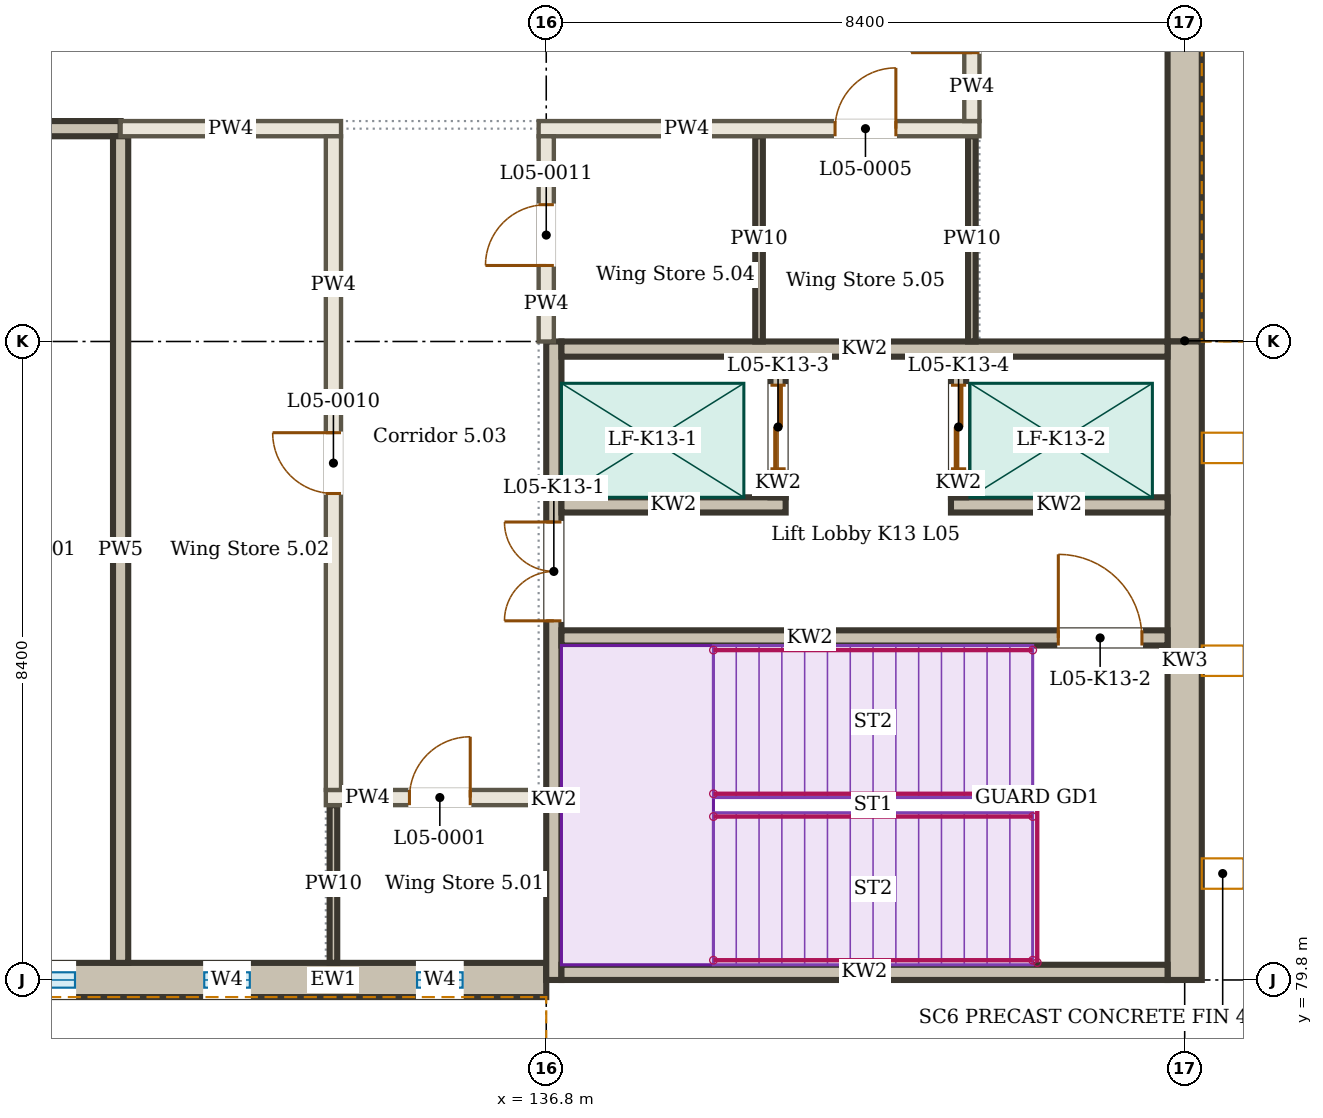
"""IFC4 building model, lengths in metres.
Left out: names, types, materials, properties, quantities, classifications, styles, units other than length and angle.
Written with IfcOpenShell. Run it as: python <this file> out.ifc"""

import sys

from ifc_helpers import new_model, si_unit, direction, frame, frame_2d, origin, place, context, subcontext, project, spatial, rectangle, extrude, element, fill, save


model = new_model("IFC4")
c1 = context("Model", 3, precision=1e-05, world=origin(), true_north=direction((0.0, 1.0)))
c2 = subcontext(c1, "Body", "Model", "MODEL_VIEW")
j1 = project(units=[si_unit("LENGTHUNIT", "METRE"), si_unit("PLANEANGLEUNIT", "RADIAN")], contexts=[c1])
p1 = place(None, origin())
s1 = spatial("IfcSite", under=j1, at=p1, CompositionType="ELEMENT")
p2 = place(p1, origin())
s2 = spatial("IfcBuilding", under=s1, at=p2, CompositionType="ELEMENT")
p3 = place(p2, frame((0.0, 0.0, 22.5)))
s3 = spatial("IfcBuildingStorey", under=s2, at=p3, CompositionType="ELEMENT", Elevation=22.5)
p4 = place(p3, frame((145.2, 88.2, 0.0), z_axis=(0.0, 0.0, 1.0), x_axis=(0.0, 1.0, 0.0)))
e1 = element("IfcWall", 1, at=p4, inside=s3, PredefinedType="SOLIDWALL", context=c2, shape_type="SweptSolid", body=[
    extrude(rectangle(XDim=8.218, YDim=0.45, at=frame_2d((4.109, 0.0))), origin(), (0.0, 0.0, 1.0), 3.85),
])
p5 = place(p3, frame((128.597, 79.8, 0.0), z_axis=(0.0, 0.0, 1.0), x_axis=(1.0, 0.0, 0.0)))
e2 = element("IfcWall", 2, at=p5, inside=s3, PredefinedType="SOLIDWALL", context=c2, shape_type="SweptSolid", body=[
    extrude(rectangle(XDim=8.203, YDim=0.45, at=frame_2d((4.101, 0.0))), origin(), (0.0, 0.0, 1.0), 3.85),
])
p6 = place(p5, frame((0.403, 0.0, 0.9)))
e3 = element("IfcOpeningElement", 3, at=p6, cuts=e2, PredefinedType="OPENING", context=c2, shape_type="SweptSolid", body=[
    extrude(rectangle(XDim=1.6, YDim=1.2, at=frame_2d((0.8, 0.6))), frame((0.0, 0.235, 0.0), z_axis=(0.0, -1.0, 0.0), x_axis=(1.0, 0.0, 0.0)), (0.0, 0.0, 1.0), 0.47),
])
p7 = place(p5, frame((3.702, 0.0, 2.1)))
e4 = element("IfcOpeningElement", 4, at=p7, cuts=e2, PredefinedType="OPENING", context=c2, shape_type="SweptSolid", body=[
    extrude(rectangle(XDim=0.6, YDim=1.2, at=frame_2d((0.3, 0.6))), frame((0.0, 0.235, 0.0), z_axis=(0.0, -1.0, 0.0), x_axis=(1.0, 0.0, 0.0)), (0.0, 0.0, 1.0), 0.47),
])
p8 = place(p5, frame((6.502, 0.0, 2.1)))
e5 = element("IfcOpeningElement", 5, at=p8, cuts=e2, PredefinedType="OPENING", context=c2, shape_type="SweptSolid", body=[
    extrude(rectangle(XDim=0.6, YDim=1.2, at=frame_2d((0.3, 0.6))), frame((0.0, 0.235, 0.0), z_axis=(0.0, -1.0, 0.0), x_axis=(1.0, 0.0, 0.0)), (0.0, 0.0, 1.0), 0.47),
])
p9 = place(p3, frame((133.9, 82.2, 0.0), z_axis=(0.0, 0.0, 1.0), x_axis=(1.0, 0.0, 0.0)))
e6 = element("IfcWall", 6, at=p9, inside=s3, PredefinedType="PARTITIONING", context=c2, shape_type="SweptSolid", body=[
    extrude(rectangle(XDim=2.9, YDim=0.2, at=frame_2d((1.45, 0.0))), origin(), (0.0, 0.0, 1.0), 3.936),
])
p10 = place(p9, frame((1.1, 0.0, 0.0)))
e7 = element("IfcOpeningElement", 7, at=p10, cuts=e6, PredefinedType="OPENING", context=c2, shape_type="SweptSolid", body=[
    extrude(rectangle(XDim=0.8, YDim=2.1, at=frame_2d((0.4, 1.05))), frame((0.0, 0.11, 0.0), z_axis=(0.0, -1.0, 0.0), x_axis=(1.0, 0.0, 0.0)), (0.0, 0.0, 1.0), 0.22),
])
p11 = place(p3, frame((111.825, 91.0, 0.0), z_axis=(0.0, 0.0, 1.0), x_axis=(1.0, 0.0, 0.0)))
e8 = element("IfcWall", 8, at=p11, inside=s3, PredefinedType="SOLIDWALL", context=c2, shape_type="SweptSolid", body=[
    extrude(rectangle(XDim=19.375, YDim=0.2, at=frame_2d((9.688, 0.0))), origin(), (0.0, 0.0, 1.0), 3.844),
])
p12 = place(p11, frame((3.175, 0.0, 0.0)))
e9 = element("IfcOpeningElement", 9, at=p12, cuts=e8, PredefinedType="OPENING", context=c2, shape_type="SweptSolid", body=[
    extrude(rectangle(XDim=1.6, YDim=2.1, at=frame_2d((0.8, 1.05))), frame((0.0, 0.11, 0.0), z_axis=(0.0, -1.0, 0.0), x_axis=(1.0, 0.0, 0.0)), (0.0, 0.0, 1.0), 0.22),
])
p13 = place(p11, frame((10.175, 0.0, 0.0)))
e10 = element("IfcOpeningElement", 10, at=p13, cuts=e8, PredefinedType="OPENING", context=c2, shape_type="SweptSolid", body=[
    extrude(rectangle(XDim=1.6, YDim=2.1, at=frame_2d((0.8, 1.05))), frame((0.0, 0.11, 0.0), z_axis=(0.0, -1.0, 0.0), x_axis=(1.0, 0.0, 0.0)), (0.0, 0.0, 1.0), 0.22),
])
p14 = place(p11, frame((15.775, 0.0, 0.0)))
e11 = element("IfcOpeningElement", 11, at=p14, cuts=e8, PredefinedType="OPENING", context=c2, shape_type="SweptSolid", body=[
    extrude(rectangle(XDim=1.6, YDim=2.1, at=frame_2d((0.8, 1.05))), frame((0.0, 0.11, 0.0), z_axis=(0.0, -1.0, 0.0), x_axis=(1.0, 0.0, 0.0)), (0.0, 0.0, 1.0), 0.22),
])
p15 = place(p3, frame((131.2, 91.0, 0.0), z_axis=(0.0, 0.0, 1.0), x_axis=(1.0, 0.0, 0.0)))
e12 = element("IfcWall", 12, at=p15, inside=s3, PredefinedType="PARTITIONING", context=c2, shape_type="SweptSolid", body=[
    extrude(rectangle(XDim=2.9, YDim=0.2, at=frame_2d((1.45, 0.0))), origin(), (0.0, 0.0, 1.0), 3.936),
])
p16 = place(p3, frame((136.7, 91.0, 0.0), z_axis=(0.0, 0.0, 1.0), x_axis=(1.0, 0.0, 0.0)))
e13 = element("IfcWall", 13, at=p16, inside=s3, PredefinedType="PARTITIONING", context=c2, shape_type="SweptSolid", body=[
    extrude(rectangle(XDim=5.8, YDim=0.2, at=frame_2d((2.9, 0.0))), origin(), (0.0, 0.0, 1.0), 3.844),
])
p17 = place(p16, frame((3.9, 0.0, 0.0)))
e14 = element("IfcOpeningElement", 14, at=p17, cuts=e13, PredefinedType="OPENING", context=c2, shape_type="SweptSolid", body=[
    extrude(rectangle(XDim=0.8, YDim=2.1, at=frame_2d((0.4, 1.05))), frame((0.0, 0.11, 0.0), z_axis=(0.0, -1.0, 0.0), x_axis=(1.0, 0.0, 0.0)), (0.0, 0.0, 1.0), 0.22),
])
p18 = place(p3, frame((131.2, 80.025, 0.0), z_axis=(0.0, 0.0, 1.0), x_axis=(0.0, 1.0, 0.0)))
e15 = element("IfcWall", 15, at=p18, inside=s3, PredefinedType="SOLIDWALL", context=c2, shape_type="SweptSolid", body=[
    extrude(rectangle(XDim=10.875, YDim=0.2, at=frame_2d((5.438, 0.0))), origin(), (0.0, 0.0, 1.0), 3.844),
])
p19 = place(p3, frame((134.0, 80.025, 0.0), z_axis=(0.0, 0.0, 1.0), x_axis=(0.0, 1.0, 0.0)))
e16 = element("IfcWall", 16, at=p19, inside=s3, PredefinedType="SOLIDWALL", context=c2, shape_type="SweptSolid", body=[
    extrude(rectangle(XDim=2.075, YDim=0.1, at=frame_2d((1.038, 0.0))), origin(), (0.0, 0.0, 1.0), 3.936),
])
p20 = place(p3, frame((134.0, 82.3, 0.0), z_axis=(0.0, 0.0, 1.0), x_axis=(0.0, 1.0, 0.0)))
e17 = element("IfcWall", 17, at=p20, inside=s3, PredefinedType="PARTITIONING", context=c2, shape_type="SweptSolid", body=[
    extrude(rectangle(XDim=8.6, YDim=0.2, at=frame_2d((4.3, 0.0))), origin(), (0.0, 0.0, 1.0), 3.844),
])
p21 = place(p20, frame((3.9, 0.0, 0.0)))
e18 = element("IfcOpeningElement", 18, at=p21, cuts=e17, PredefinedType="OPENING", context=c2, shape_type="SweptSolid", body=[
    extrude(rectangle(XDim=0.8, YDim=2.1, at=frame_2d((0.4, 1.05))), frame((0.0, 0.11, 0.0), z_axis=(0.0, -1.0, 0.0), x_axis=(1.0, 0.0, 0.0)), (0.0, 0.0, 1.0), 0.22),
])
p22 = place(p3, frame((136.8, 88.2, 0.0), z_axis=(0.0, 0.0, 1.0), x_axis=(0.0, 1.0, 0.0)))
e19 = element("IfcWall", 19, at=p22, inside=s3, PredefinedType="PARTITIONING", context=c2, shape_type="SweptSolid", body=[
    extrude(rectangle(XDim=2.7, YDim=0.2, at=frame_2d((1.35, 0.0))), origin(), (0.0, 0.0, 1.0), 3.844),
])
p23 = place(p22, frame((1.0, 0.0, 0.0)))
e20 = element("IfcOpeningElement", 20, at=p23, cuts=e19, PredefinedType="OPENING", context=c2, shape_type="SweptSolid", body=[
    extrude(rectangle(XDim=0.8, YDim=2.1, at=frame_2d((0.4, 1.05))), frame((0.0, 0.11, 0.0), z_axis=(0.0, -1.0, 0.0), x_axis=(1.0, 0.0, 0.0)), (0.0, 0.0, 1.0), 0.22),
])
for number, where, z_axis, x_axis in (
    (21, (139.6, 88.2, 0.0), (0.0, 0.0, 1.0), (0.0, 1.0, 0.0)),
    (22, (142.4, 88.2, 0.0), (0.0, 0.0, 1.0), (0.0, 1.0, 0.0)),
):
    element("IfcWall", number, at=place(p3, frame(where, z_axis=z_axis, x_axis=x_axis)), inside=s3, PredefinedType="SOLIDWALL", context=c2, shape_type="SweptSolid", body=[
        extrude(rectangle(XDim=2.7, YDim=0.1, at=frame_2d((1.35, 0.0))), origin(), (0.0, 0.0, 1.0), 3.936),
    ])
p24 = place(p3, frame((142.4, 91.1, 0.0), z_axis=(0.0, 0.0, 1.0), x_axis=(0.0, 1.0, 0.0)))
e23 = element("IfcWall", 23, at=p24, inside=s3, PredefinedType="PARTITIONING", context=c2, shape_type="SweptSolid", body=[
    extrude(rectangle(XDim=2.6, YDim=0.2, at=frame_2d((1.3, 0.0))), origin(), (0.0, 0.0, 1.0), 3.936),
])
p25 = place(p24, frame((0.9, 0.0, 0.0)))
e24 = element("IfcOpeningElement", 24, at=p25, cuts=e23, PredefinedType="OPENING", context=c2, shape_type="SweptSolid", body=[
    extrude(rectangle(XDim=0.8, YDim=2.1, at=frame_2d((0.4, 1.05))), frame((0.0, 0.11, 0.0), z_axis=(0.0, -1.0, 0.0), x_axis=(1.0, 0.0, 0.0)), (0.0, 0.0, 1.0), 0.22),
])
p26 = place(p3, frame((136.9, 79.8, 0.0), z_axis=(0.0, 0.0, 1.0), x_axis=(0.0, 1.0, 0.0)))
e25 = element("IfcWall", 25, at=p26, inside=s3, PredefinedType="SOLIDWALL", context=c2, shape_type="SweptSolid", body=[
    extrude(rectangle(XDim=8.4, YDim=0.2, at=frame_2d((4.2, 0.0))), origin(), (0.0, 0.0, 1.0), 4.5),
])
p27 = place(p26, frame((4.725, 0.0, 0.0)))
e26 = element("IfcOpeningElement", 26, at=p27, cuts=e25, PredefinedType="OPENING", context=c2, shape_type="SweptSolid", body=[
    extrude(rectangle(XDim=1.3, YDim=2.1, at=frame_2d((0.65, 1.05))), frame((0.0, 0.11, 0.0), z_axis=(0.0, -1.0, 0.0), x_axis=(1.0, 0.0, 0.0)), (0.0, 0.0, 1.0), 0.22),
])
p28 = place(p3, frame((145.2, 79.8, 0.0), z_axis=(0.0, 0.0, 1.0), x_axis=(0.0, 1.0, 0.0)))
e27 = element("IfcWall", 27, at=p28, inside=s3, PredefinedType="SOLIDWALL", context=c2, shape_type="SweptSolid", body=[
    extrude(rectangle(XDim=8.4, YDim=0.45, at=frame_2d((4.2, 0.0))), origin(), (0.0, 0.0, 1.0), 4.5),
])
for number, where, z_axis, x_axis in (
    (28, (137.0, 79.9, 0.0), (0.0, 0.0, 1.0), (1.0, 0.0, 0.0)),
    (29, (137.0, 88.1, 0.0), (0.0, 0.0, 1.0), (1.0, 0.0, 0.0)),
):
    element("IfcWall", number, at=place(p3, frame(where, z_axis=z_axis, x_axis=x_axis)), inside=s3, PredefinedType="SOLIDWALL", context=c2, shape_type="SweptSolid", body=[
        extrude(rectangle(XDim=7.975, YDim=0.2, at=frame_2d((3.988, 0.0))), origin(), (0.0, 0.0, 1.0), 4.5),
    ])
p29 = place(p3, frame((137.0, 84.3, 0.0), z_axis=(0.0, 0.0, 1.0), x_axis=(1.0, 0.0, 0.0)))
e30 = element("IfcWall", 30, at=p29, inside=s3, PredefinedType="SOLIDWALL", context=c2, shape_type="SweptSolid", body=[
    extrude(rectangle(XDim=7.975, YDim=0.2, at=frame_2d((3.988, 0.0))), origin(), (0.0, 0.0, 1.0), 4.5),
])
p30 = place(p29, frame((6.538, 0.0, 0.0)))
e31 = element("IfcOpeningElement", 31, at=p30, cuts=e30, PredefinedType="OPENING", context=c2, shape_type="SweptSolid", body=[
    extrude(rectangle(XDim=1.1, YDim=2.1, at=frame_2d((0.55, 1.05))), frame((0.0, 0.11, 0.0), z_axis=(0.0, -1.0, 0.0), x_axis=(1.0, 0.0, 0.0)), (0.0, 0.0, 1.0), 0.22),
])
p31 = place(p3, frame((137.0, 86.05, 0.0), z_axis=(0.0, 0.0, 1.0), x_axis=(1.0, 0.0, 0.0)))
e32 = element("IfcWall", 32, at=p31, inside=s3, PredefinedType="SOLIDWALL", context=c2, shape_type="SweptSolid", body=[
    extrude(rectangle(XDim=2.95, YDim=0.2, at=frame_2d((1.475, 0.0))), origin(), (0.0, 0.0, 1.0), 4.5),
])
p32 = place(p3, frame((142.125, 86.05, 0.0), z_axis=(0.0, 0.0, 1.0), x_axis=(1.0, 0.0, 0.0)))
e33 = element("IfcWall", 33, at=p32, inside=s3, PredefinedType="SOLIDWALL", context=c2, shape_type="SweptSolid", body=[
    extrude(rectangle(XDim=2.85, YDim=0.2, at=frame_2d((1.425, 0.0))), origin(), (0.0, 0.0, 1.0), 4.5),
])
p33 = place(p3, frame((139.85, 86.15, 0.0), z_axis=(0.0, 0.0, 1.0), x_axis=(0.0, 1.0, 0.0)))
e34 = element("IfcWall", 34, at=p33, inside=s3, PredefinedType="SOLIDWALL", context=c2, shape_type="SweptSolid", body=[
    extrude(rectangle(XDim=1.85, YDim=0.2, at=frame_2d((0.925, 0.0))), origin(), (0.0, 0.0, 1.0), 4.5),
])
p34 = place(p33, frame((0.375, 0.0, 0.0)))
e35 = element("IfcOpeningElement", 35, at=p34, cuts=e34, PredefinedType="OPENING", context=c2, shape_type="SweptSolid", body=[
    extrude(rectangle(XDim=1.1, YDim=2.1, at=frame_2d((0.55, 1.05))), frame((0.0, 0.11, 0.0), z_axis=(0.0, -1.0, 0.0), x_axis=(1.0, 0.0, 0.0)), (0.0, 0.0, 1.0), 0.22),
])
p35 = place(p3, frame((142.225, 86.15, 0.0), z_axis=(0.0, 0.0, 1.0), x_axis=(0.0, 1.0, 0.0)))
e36 = element("IfcWall", 36, at=p35, inside=s3, PredefinedType="SOLIDWALL", context=c2, shape_type="SweptSolid", body=[
    extrude(rectangle(XDim=1.85, YDim=0.2, at=frame_2d((0.925, 0.0))), origin(), (0.0, 0.0, 1.0), 4.5),
])
p36 = place(p35, frame((0.375, 0.0, 0.0)))
e37 = element("IfcOpeningElement", 37, at=p36, cuts=e36, PredefinedType="OPENING", context=c2, shape_type="SweptSolid", body=[
    extrude(rectangle(XDim=1.1, YDim=2.1, at=frame_2d((0.55, 1.05))), frame((0.0, 0.11, 0.0), z_axis=(0.0, -1.0, 0.0), x_axis=(1.0, 0.0, 0.0)), (0.0, 0.0, 1.0), 0.22),
])
p37 = place(p6, origin())
e38 = element("IfcWindow", 38, at=p37, inside=s3, PartitioningType="SINGLE_PANEL", PredefinedType="WINDOW", context=c2, shape_type="SweptSolid", body=[
    extrude(rectangle(XDim=1.6, YDim=1.2, at=frame_2d((0.8, 0.6))), frame((0.0, 0.03, 0.0), z_axis=(0.0, -1.0, 0.0), x_axis=(1.0, 0.0, 0.0)), (0.0, 0.0, 1.0), 0.06),
])
fill(e3, e38)
p38 = place(p7, origin())
e39 = element("IfcWindow", 39, at=p38, inside=s3, PartitioningType="SINGLE_PANEL", PredefinedType="WINDOW", context=c2, shape_type="SweptSolid", body=[
    extrude(rectangle(XDim=0.6, YDim=1.2, at=frame_2d((0.3, 0.6))), frame((0.0, 0.135, 0.0), z_axis=(0.0, -1.0, 0.0), x_axis=(1.0, 0.0, 0.0)), (0.0, 0.0, 1.0), 0.06),
])
fill(e4, e39)
p39 = place(p8, origin())
e40 = element("IfcWindow", 40, at=p39, inside=s3, PartitioningType="SINGLE_PANEL", PredefinedType="WINDOW", context=c2, shape_type="SweptSolid", body=[
    extrude(rectangle(XDim=0.6, YDim=1.2, at=frame_2d((0.3, 0.6))), frame((0.0, 0.135, 0.0), z_axis=(0.0, -1.0, 0.0), x_axis=(1.0, 0.0, 0.0)), (0.0, 0.0, 1.0), 0.06),
])
fill(e5, e40)
p40 = place(p10, origin())
e41 = element("IfcDoor", 41, at=p40, inside=s3, OperationType="SINGLE_SWING_RIGHT", PredefinedType="DOOR", context=c2, shape_type="SweptSolid", body=[
    extrude(rectangle(XDim=0.8, YDim=2.1, at=frame_2d((0.4, 1.05))), frame((0.0, 0.025, 0.0), z_axis=(0.0, -1.0, 0.0), x_axis=(1.0, 0.0, 0.0)), (0.0, 0.0, 1.0), 0.05),
])
fill(e7, e41)
p41 = place(p17, origin())
e42 = element("IfcDoor", 42, at=p41, inside=s3, OperationType="SINGLE_SWING_RIGHT", PredefinedType="DOOR", context=c2, shape_type="SweptSolid", body=[
    extrude(rectangle(XDim=0.8, YDim=2.1, at=frame_2d((0.4, 1.05))), frame((0.0, 0.025, 0.0), z_axis=(0.0, -1.0, 0.0), x_axis=(1.0, 0.0, 0.0)), (0.0, 0.0, 1.0), 0.05),
])
fill(e14, e42)
p42 = place(p21, origin())
e43 = element("IfcDoor", 43, at=p42, inside=s3, OperationType="SINGLE_SWING_RIGHT", PredefinedType="DOOR", context=c2, shape_type="SweptSolid", body=[
    extrude(rectangle(XDim=0.8, YDim=2.1, at=frame_2d((0.4, 1.05))), frame((0.0, 0.025, 0.0), z_axis=(0.0, -1.0, 0.0), x_axis=(1.0, 0.0, 0.0)), (0.0, 0.0, 1.0), 0.05),
])
fill(e18, e43)
p43 = place(p23, origin())
e44 = element("IfcDoor", 44, at=p43, inside=s3, OperationType="SINGLE_SWING_LEFT", PredefinedType="DOOR", context=c2, shape_type="SweptSolid", body=[
    extrude(rectangle(XDim=0.8, YDim=2.1, at=frame_2d((0.4, 1.05))), frame((0.0, 0.025, 0.0), z_axis=(0.0, -1.0, 0.0), x_axis=(1.0, 0.0, 0.0)), (0.0, 0.0, 1.0), 0.05),
])
fill(e20, e44)
p44 = place(p25, origin())
e45 = element("IfcDoor", 45, at=p44, inside=s3, OperationType="SINGLE_SWING_LEFT", PredefinedType="DOOR", context=c2, shape_type="SweptSolid", body=[
    extrude(rectangle(XDim=0.8, YDim=2.1, at=frame_2d((0.4, 1.05))), frame((0.0, 0.025, 0.0), z_axis=(0.0, -1.0, 0.0), x_axis=(1.0, 0.0, 0.0)), (0.0, 0.0, 1.0), 0.05),
])
fill(e24, e45)
p45 = place(p27, origin())
e46 = element("IfcDoor", 46, at=p45, inside=s3, OperationType="DOUBLE_DOOR_DOUBLE_SWING", PredefinedType="DOOR", context=c2, shape_type="SweptSolid", body=[
    extrude(rectangle(XDim=1.3, YDim=2.1, at=frame_2d((0.65, 1.05))), frame((0.0, 0.025, 0.0), z_axis=(0.0, -1.0, 0.0), x_axis=(1.0, 0.0, 0.0)), (0.0, 0.0, 1.0), 0.05),
])
fill(e26, e46)
p46 = place(p30, origin())
e47 = element("IfcDoor", 47, at=p46, inside=s3, OperationType="SINGLE_SWING_LEFT", PredefinedType="DOOR", context=c2, shape_type="SweptSolid", body=[
    extrude(rectangle(XDim=1.1, YDim=2.1, at=frame_2d((0.55, 1.05))), frame((0.0, 0.025, 0.0), z_axis=(0.0, -1.0, 0.0), x_axis=(1.0, 0.0, 0.0)), (0.0, 0.0, 1.0), 0.05),
])
fill(e31, e47)
p47 = place(p34, origin())
e48 = element("IfcDoor", 48, at=p47, inside=s3, OperationType="DOUBLE_DOOR_SLIDING", PredefinedType="DOOR", context=c2, shape_type="SweptSolid", body=[
    extrude(rectangle(XDim=1.1, YDim=2.1, at=frame_2d((0.55, 1.05))), frame((0.0, 0.025, 0.0), z_axis=(0.0, -1.0, 0.0), x_axis=(1.0, 0.0, 0.0)), (0.0, 0.0, 1.0), 0.05),
])
fill(e35, e48)
p48 = place(p36, origin())
e49 = element("IfcDoor", 49, at=p48, inside=s3, OperationType="DOUBLE_DOOR_SLIDING", PredefinedType="DOOR", context=c2, shape_type="SweptSolid", body=[
    extrude(rectangle(XDim=1.1, YDim=2.1, at=frame_2d((0.55, 1.05))), frame((0.0, 0.025, 0.0), z_axis=(0.0, -1.0, 0.0), x_axis=(1.0, 0.0, 0.0)), (0.0, 0.0, 1.0), 0.05),
])
fill(e37, e49)
save(model, sys.argv[1])
